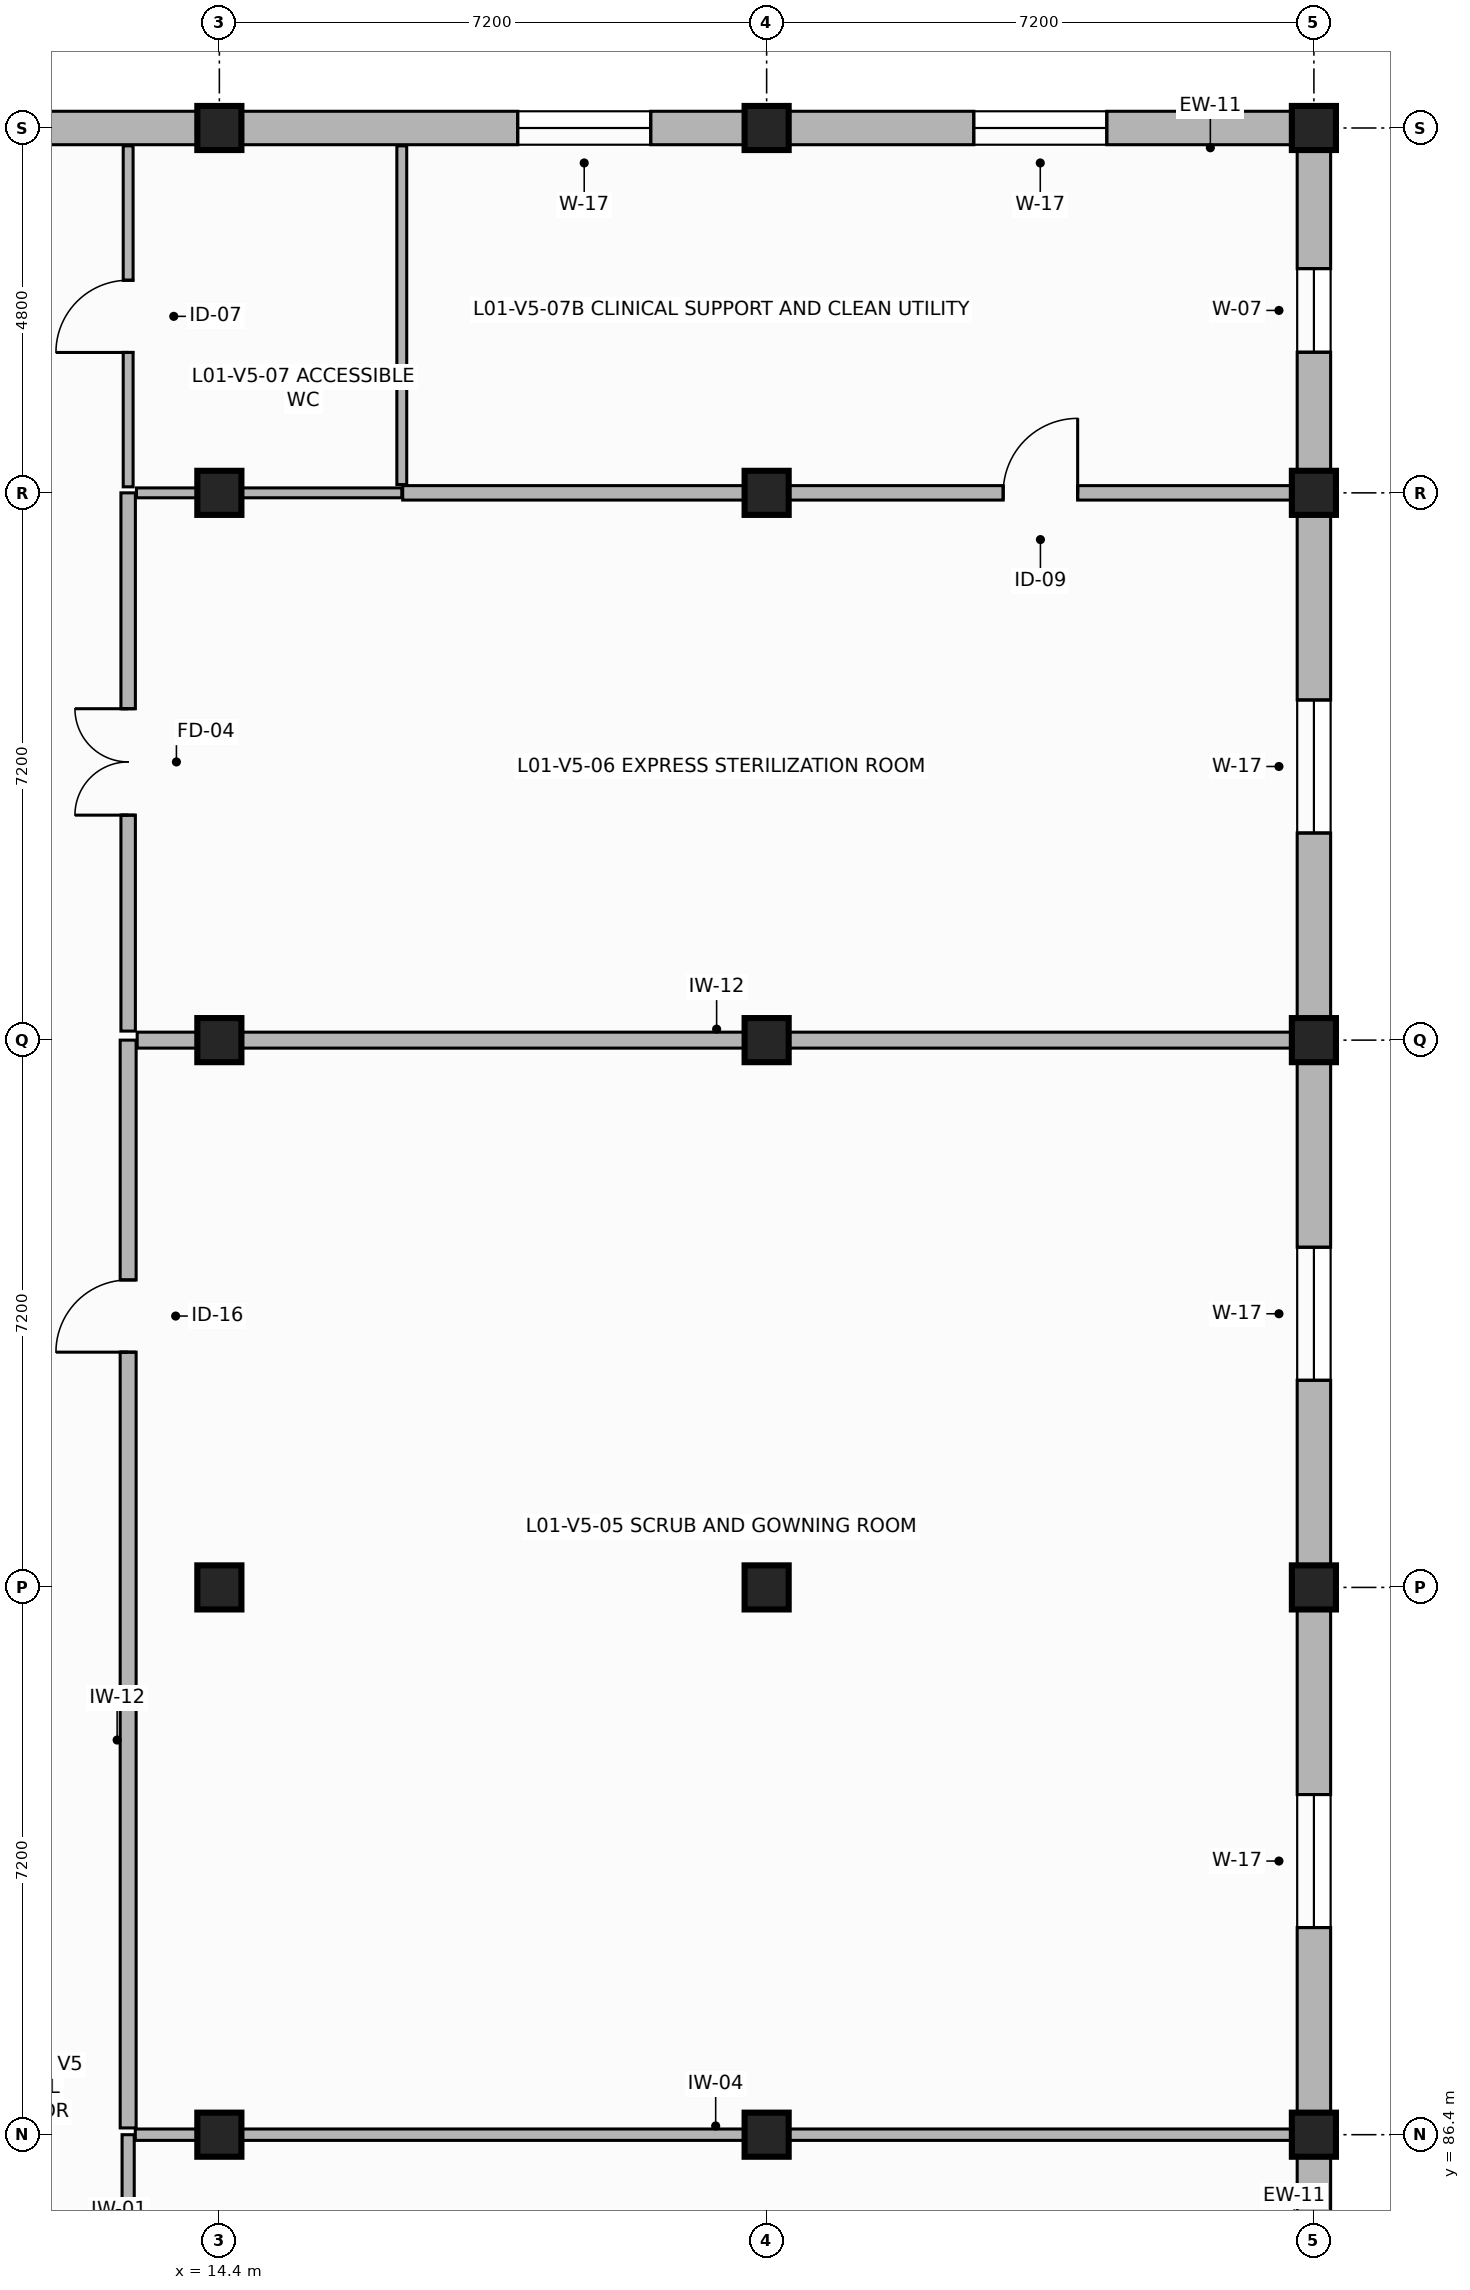
"""IFC4 building model, lengths in metres.
Left out: names, types, materials, properties, quantities, classifications, styles, units other than length and angle.
Written with IfcOpenShell. Run it as: python <this file> out.ifc"""

import sys

from ifc_helpers import new_model, si_unit, direction, frame, frame_2d, origin, origin_2d, place, context, subcontext, project, spatial, rectangle, extrude, element, fill, save


model = new_model("IFC4")
c1 = context("Model", 3, precision=1e-05, world=origin(), true_north=direction((0.0, 1.0)))
c2 = subcontext(c1, "Body", "Model", "MODEL_VIEW")
j1 = project(units=[si_unit("LENGTHUNIT", "METRE"), si_unit("PLANEANGLEUNIT", "RADIAN")], contexts=[c1])
p1 = place(None, origin())
s1 = spatial("IfcSite", under=j1, at=p1, CompositionType="ELEMENT")
p2 = place(p1, origin())
s2 = spatial("IfcBuilding", under=s1, at=p2, CompositionType="ELEMENT")
p3 = place(p2, frame((0.0, 0.0, 4.5)))
s3 = spatial("IfcBuildingStorey", under=s2, at=p3, CompositionType="ELEMENT", Elevation=4.5)
for number, where, z_axis, x_axis in (
    (1, (14.4, 86.4, 0.0), (0.0, 0.0, 1.0), (1.0, 0.0, 0.0)),
    (2, (14.4, 93.6, 0.0), (0.0, 0.0, 1.0), (1.0, 0.0, 0.0)),
    (3, (14.4, 100.8, 0.0), (0.0, 0.0, 1.0), (1.0, 0.0, 0.0)),
    (4, (14.4, 108.0, 0.0), (0.0, 0.0, 1.0), (1.0, 0.0, 0.0)),
    (5, (14.4, 112.8, 0.0), (0.0, 0.0, 1.0), (1.0, 0.0, 0.0)),
    (6, (21.6, 86.4, 0.0), (0.0, 0.0, 1.0), (1.0, 0.0, 0.0)),
    (7, (21.6, 93.6, 0.0), (0.0, 0.0, 1.0), (1.0, 0.0, 0.0)),
    (8, (21.6, 100.8, 0.0), (0.0, 0.0, 1.0), (1.0, 0.0, 0.0)),
    (9, (21.6, 108.0, 0.0), (0.0, 0.0, 1.0), (1.0, 0.0, 0.0)),
    (10, (21.6, 112.8, 0.0), (0.0, 0.0, 1.0), (1.0, 0.0, 0.0)),
    (11, (28.8, 86.4, 0.0), (0.0, 0.0, 1.0), (1.0, 0.0, 0.0)),
    (12, (28.8, 93.6, 0.0), (0.0, 0.0, 1.0), (1.0, 0.0, 0.0)),
    (13, (28.8, 100.8, 0.0), (0.0, 0.0, 1.0), (1.0, 0.0, 0.0)),
    (14, (28.8, 108.0, 0.0), (0.0, 0.0, 1.0), (1.0, 0.0, 0.0)),
    (15, (28.8, 112.8, 0.0), (0.0, 0.0, 1.0), (1.0, 0.0, 0.0)),
):
    element("IfcColumn", number, at=place(p3, frame(where, z_axis=z_axis, x_axis=x_axis)), inside=s3, PredefinedType="COLUMN", context=c2, shape_type="SweptSolid", body=[
        extrude(rectangle(XDim=0.58, YDim=0.58, at=origin_2d()), origin(), (0.0, 0.0, 1.0), 3.59),
    ])
p4 = place(p3, frame((28.8, 79.2, 0.0), z_axis=(0.0, 0.0, 1.0), x_axis=(0.0, 1.0, 0.0)))
e16 = element("IfcWall", 16, at=p4, inside=s3, PredefinedType="SOLIDWALL", context=c2, shape_type="SweptSolid", body=[
    extrude(rectangle(XDim=7.2, YDim=0.44, at=frame_2d((3.6, 0.0))), origin(), (0.0, 0.0, 1.0), 2.92),
])
p5 = place(p4, frame((2.725, 0.0, 0.9)))
e17 = element("IfcOpeningElement", 17, at=p5, cuts=e16, PredefinedType="OPENING", context=c2, shape_type="SweptSolid", body=[
    extrude(rectangle(XDim=1.75, YDim=1.8, at=frame_2d((0.875, 0.9))), frame((0.0, 0.23, 0.0), z_axis=(0.0, -1.0, 0.0), x_axis=(1.0, 0.0, 0.0)), (0.0, 0.0, 1.0), 0.46),
])
p6 = place(p3, frame((28.8, 86.4, 0.0), z_axis=(0.0, 0.0, 1.0), x_axis=(0.0, 1.0, 0.0)))
e18 = element("IfcWall", 18, at=p6, inside=s3, PredefinedType="SOLIDWALL", context=c2, shape_type="SweptSolid", body=[
    extrude(rectangle(XDim=7.2, YDim=0.44, at=frame_2d((3.6, 0.0))), origin(), (0.0, 0.0, 1.0), 2.92),
])
p7 = place(p6, frame((2.725, 0.0, 0.9)))
e19 = element("IfcOpeningElement", 19, at=p7, cuts=e18, PredefinedType="OPENING", context=c2, shape_type="SweptSolid", body=[
    extrude(rectangle(XDim=1.75, YDim=1.8, at=frame_2d((0.875, 0.9))), frame((0.0, 0.23, 0.0), z_axis=(0.0, -1.0, 0.0), x_axis=(1.0, 0.0, 0.0)), (0.0, 0.0, 1.0), 0.46),
])
p8 = place(p3, frame((28.8, 93.6, 0.0), z_axis=(0.0, 0.0, 1.0), x_axis=(0.0, 1.0, 0.0)))
e20 = element("IfcWall", 20, at=p8, inside=s3, PredefinedType="SOLIDWALL", context=c2, shape_type="SweptSolid", body=[
    extrude(rectangle(XDim=7.2, YDim=0.44, at=frame_2d((3.6, 0.0))), origin(), (0.0, 0.0, 1.0), 2.92),
])
p9 = place(p8, frame((2.725, 0.0, 0.9)))
e21 = element("IfcOpeningElement", 21, at=p9, cuts=e20, PredefinedType="OPENING", context=c2, shape_type="SweptSolid", body=[
    extrude(rectangle(XDim=1.75, YDim=1.8, at=frame_2d((0.875, 0.9))), frame((0.0, 0.23, 0.0), z_axis=(0.0, -1.0, 0.0), x_axis=(1.0, 0.0, 0.0)), (0.0, 0.0, 1.0), 0.46),
])
p10 = place(p3, frame((28.8, 100.8, 0.0), z_axis=(0.0, 0.0, 1.0), x_axis=(0.0, 1.0, 0.0)))
e22 = element("IfcWall", 22, at=p10, inside=s3, PredefinedType="SOLIDWALL", context=c2, shape_type="SweptSolid", body=[
    extrude(rectangle(XDim=7.2, YDim=0.44, at=frame_2d((3.6, 0.0))), origin(), (0.0, 0.0, 1.0), 2.92),
])
p11 = place(p10, frame((2.725, 0.0, 0.9)))
e23 = element("IfcOpeningElement", 23, at=p11, cuts=e22, PredefinedType="OPENING", context=c2, shape_type="SweptSolid", body=[
    extrude(rectangle(XDim=1.75, YDim=1.8, at=frame_2d((0.875, 0.9))), frame((0.0, 0.23, 0.0), z_axis=(0.0, -1.0, 0.0), x_axis=(1.0, 0.0, 0.0)), (0.0, 0.0, 1.0), 0.46),
])
p12 = place(p3, frame((28.8, 108.0, 0.0), z_axis=(0.0, 0.0, 1.0), x_axis=(0.0, 1.0, 0.0)))
e24 = element("IfcWall", 24, at=p12, inside=s3, PredefinedType="SOLIDWALL", context=c2, shape_type="SweptSolid", body=[
    extrude(rectangle(XDim=4.8, YDim=0.44, at=frame_2d((2.4, 0.0))), origin(), (0.0, 0.0, 1.0), 2.92),
])
p13 = place(p12, frame((1.85, 0.0, 0.85)))
e25 = element("IfcOpeningElement", 25, at=p13, cuts=e24, PredefinedType="OPENING", context=c2, shape_type="SweptSolid", body=[
    extrude(rectangle(XDim=1.1, YDim=1.85, at=frame_2d((0.55, 0.925))), frame((0.0, 0.23, 0.0), z_axis=(0.0, -1.0, 0.0), x_axis=(1.0, 0.0, 0.0)), (0.0, 0.0, 1.0), 0.46),
])
p14 = place(p3, frame((28.8, 112.8, 0.0), z_axis=(0.0, 0.0, 1.0), x_axis=(-1.0, 0.0, 0.0)))
e26 = element("IfcWall", 26, at=p14, inside=s3, PredefinedType="SOLIDWALL", context=c2, shape_type="SweptSolid", body=[
    extrude(rectangle(XDim=7.2, YDim=0.44, at=frame_2d((3.6, 0.0))), origin(), (0.0, 0.0, 1.0), 2.92),
])
p15 = place(p14, frame((2.725, 0.0, 0.9)))
e27 = element("IfcOpeningElement", 27, at=p15, cuts=e26, PredefinedType="OPENING", context=c2, shape_type="SweptSolid", body=[
    extrude(rectangle(XDim=1.75, YDim=1.8, at=frame_2d((0.875, 0.9))), frame((0.0, 0.23, 0.0), z_axis=(0.0, -1.0, 0.0), x_axis=(1.0, 0.0, 0.0)), (0.0, 0.0, 1.0), 0.46),
])
p16 = place(p3, frame((21.6, 112.8, 0.0), z_axis=(0.0, 0.0, 1.0), x_axis=(-1.0, 0.0, 0.0)))
e28 = element("IfcWall", 28, at=p16, inside=s3, PredefinedType="SOLIDWALL", context=c2, shape_type="SweptSolid", body=[
    extrude(rectangle(XDim=7.2, YDim=0.44, at=frame_2d((3.6, 0.0))), origin(), (0.0, 0.0, 1.0), 2.92),
])
p17 = place(p16, frame((1.525, 0.0, 0.9)))
e29 = element("IfcOpeningElement", 29, at=p17, cuts=e28, PredefinedType="OPENING", context=c2, shape_type="SweptSolid", body=[
    extrude(rectangle(XDim=1.75, YDim=1.8, at=frame_2d((0.875, 0.9))), frame((0.0, 0.23, 0.0), z_axis=(0.0, -1.0, 0.0), x_axis=(1.0, 0.0, 0.0)), (0.0, 0.0, 1.0), 0.46),
])
p18 = place(p3, frame((14.4, 112.8, 0.0), z_axis=(0.0, 0.0, 1.0), x_axis=(-1.0, 0.0, 0.0)))
e30 = element("IfcWall", 30, at=p18, inside=s3, PredefinedType="SOLIDWALL", context=c2, shape_type="SweptSolid", body=[
    extrude(rectangle(XDim=7.2, YDim=0.44, at=frame_2d((3.6, 0.0))), origin(), (0.0, 0.0, 1.0), 2.92),
])
p19 = place(p18, frame((4.725, 0.0, 0.9)))
e31 = element("IfcOpeningElement", 31, at=p19, cuts=e30, PredefinedType="OPENING", context=c2, shape_type="SweptSolid", body=[
    extrude(rectangle(XDim=1.75, YDim=1.8, at=frame_2d((0.875, 0.9))), frame((0.0, 0.23, 0.0), z_axis=(0.0, -1.0, 0.0), x_axis=(1.0, 0.0, 0.0)), (0.0, 0.0, 1.0), 0.46),
])
p20 = place(p3, frame((13.2, 79.435, 0.0), z_axis=(0.0, 0.0, 1.0), x_axis=(0.0, 1.0, 0.0)))
e32 = element("IfcWall", 32, at=p20, inside=s3, PredefinedType="PARTITIONING", context=c2, shape_type="SweptSolid", body=[
    extrude(rectangle(XDim=6.965, YDim=0.16, at=frame_2d((3.482, 0.0))), origin(), (0.0, 0.0, 1.0), 2.9),
])
p21 = place(p20, frame((2.84, 0.0, 0.0)))
e33 = element("IfcOpeningElement", 33, at=p21, cuts=e32, PredefinedType="OPENING", context=c2, shape_type="SweptSolid", body=[
    extrude(rectangle(XDim=1.05, YDim=2.15, at=frame_2d((0.525, 1.075))), frame((0.0, 0.09, 0.0), z_axis=(0.0, -1.0, 0.0), x_axis=(1.0, 0.0, 0.0)), (0.0, 0.0, 1.0), 0.18),
])
p22 = place(p3, frame((13.294, 86.4, 0.0), z_axis=(0.0, 0.0, 1.0), x_axis=(1.0, 0.0, 0.0)))
e34 = element("IfcWall", 34, at=p22, inside=s3, PredefinedType="PARTITIONING", context=c2, shape_type="SweptSolid", body=[
    extrude(rectangle(XDim=15.271, YDim=0.15, at=frame_2d((7.635, 0.0))), origin(), (0.0, 0.0, 1.0), 2.9),
])
p23 = place(p3, frame((13.2, 86.489, 0.0), z_axis=(0.0, 0.0, 1.0), x_axis=(0.0, 1.0, 0.0)))
e35 = element("IfcWall", 35, at=p23, inside=s3, PredefinedType="PARTITIONING", context=c2, shape_type="SweptSolid", body=[
    extrude(rectangle(XDim=14.311, YDim=0.21, at=frame_2d((7.156, 0.0))), origin(), (0.0, 0.0, 1.0), 2.9),
])
p24 = place(p23, frame((10.206, 0.0, 0.0)))
e36 = element("IfcOpeningElement", 36, at=p24, cuts=e35, PredefinedType="OPENING", context=c2, shape_type="SweptSolid", body=[
    extrude(rectangle(XDim=0.95, YDim=2.15, at=frame_2d((0.475, 1.075))), frame((0.0, 0.115, 0.0), z_axis=(0.0, -1.0, 0.0), x_axis=(1.0, 0.0, 0.0)), (0.0, 0.0, 1.0), 0.23),
])
p25 = place(p3, frame((13.319, 100.8, 0.0), z_axis=(0.0, 0.0, 1.0), x_axis=(1.0, 0.0, 0.0)))
e37 = element("IfcWall", 37, at=p25, inside=s3, PredefinedType="PARTITIONING", context=c2, shape_type="SweptSolid", body=[
    extrude(rectangle(XDim=15.246, YDim=0.21, at=frame_2d((7.623, 0.0))), origin(), (0.0, 0.0, 1.0), 2.9),
])
p26 = place(p3, frame((13.2, 100.919, 0.0), z_axis=(0.0, 0.0, 1.0), x_axis=(0.0, 1.0, 0.0)))
e38 = element("IfcWall", 38, at=p26, inside=s3, PredefinedType="PARTITIONING", context=c2, shape_type="SweptSolid", body=[
    extrude(rectangle(XDim=7.081, YDim=0.19, at=frame_2d((3.541, 0.0))), origin(), (0.0, 0.0, 1.0), 2.9),
])
p27 = place(p26, frame((2.841, 0.0, 0.0)))
e39 = element("IfcOpeningElement", 39, at=p27, cuts=e38, PredefinedType="OPENING", context=c2, shape_type="SweptSolid", body=[
    extrude(rectangle(XDim=1.4, YDim=2.25, at=frame_2d((0.7, 1.125))), frame((0.0, 0.105, 0.0), z_axis=(0.0, -1.0, 0.0), x_axis=(1.0, 0.0, 0.0)), (0.0, 0.0, 1.0), 0.21),
])
p28 = place(p3, frame((13.309, 108.0, 0.0), z_axis=(0.0, 0.0, 1.0), x_axis=(1.0, 0.0, 0.0)))
e40 = element("IfcWall", 40, at=p28, inside=s3, PredefinedType="PARTITIONING", context=c2, shape_type="SweptSolid", body=[
    extrude(rectangle(XDim=3.491, YDim=0.13, at=frame_2d((1.746, 0.0))), origin(), (0.0, 0.0, 1.0), 2.9),
])
p29 = place(p3, frame((16.812, 108.0, 0.0), z_axis=(0.0, 0.0, 1.0), x_axis=(1.0, 0.0, 0.0)))
e41 = element("IfcWall", 41, at=p29, inside=s3, PredefinedType="PARTITIONING", context=c2, shape_type="SweptSolid", body=[
    extrude(rectangle(XDim=11.753, YDim=0.19, at=frame_2d((5.876, 0.0))), origin(), (0.0, 0.0, 1.0), 2.9),
])
p30 = place(p29, frame((7.9, 0.0, 0.0)))
e42 = element("IfcOpeningElement", 42, at=p30, cuts=e41, PredefinedType="OPENING", context=c2, shape_type="SweptSolid", body=[
    extrude(rectangle(XDim=0.98, YDim=2.15, at=frame_2d((0.49, 1.075))), frame((0.0, 0.105, 0.0), z_axis=(0.0, -1.0, 0.0), x_axis=(1.0, 0.0, 0.0)), (0.0, 0.0, 1.0), 0.21),
])
p31 = place(p3, frame((16.8, 112.565, 0.0), z_axis=(0.0, 0.0, 1.0), x_axis=(0.0, -1.0, 0.0)))
e43 = element("IfcWall", 43, at=p31, inside=s3, PredefinedType="PARTITIONING", context=c2, shape_type="SweptSolid", body=[
    extrude(rectangle(XDim=4.456, YDim=0.13, at=frame_2d((2.228, 0.0))), origin(), (0.0, 0.0, 1.0), 2.9),
])
p32 = place(p3, frame((13.2, 108.079, 0.0), z_axis=(0.0, 0.0, 1.0), x_axis=(0.0, 1.0, 0.0)))
e44 = element("IfcWall", 44, at=p32, inside=s3, PredefinedType="PARTITIONING", context=c2, shape_type="SweptSolid", body=[
    extrude(rectangle(XDim=4.486, YDim=0.13, at=frame_2d((2.243, 0.0))), origin(), (0.0, 0.0, 1.0), 2.9),
])
p33 = place(p32, frame((1.768, 0.0, 0.0)))
e45 = element("IfcOpeningElement", 45, at=p33, cuts=e44, PredefinedType="OPENING", context=c2, shape_type="SweptSolid", body=[
    extrude(rectangle(XDim=0.95, YDim=2.1, at=frame_2d((0.475, 1.05))), frame((0.0, 0.075, 0.0), z_axis=(0.0, -1.0, 0.0), x_axis=(1.0, 0.0, 0.0)), (0.0, 0.0, 1.0), 0.15),
])
p34 = place(p7, origin())
e46 = element("IfcWindow", 46, at=p34, inside=s3, PartitioningType="SINGLE_PANEL", PredefinedType="WINDOW", context=c2, shape_type="SweptSolid", body=[
    extrude(rectangle(XDim=1.75, YDim=1.8, at=frame_2d((0.875, 0.9))), frame((0.0, 0.03, 0.0), z_axis=(0.0, -1.0, 0.0), x_axis=(1.0, 0.0, 0.0)), (0.0, 0.0, 1.0), 0.06),
])
fill(e19, e46)
p35 = place(p9, origin())
e47 = element("IfcWindow", 47, at=p35, inside=s3, PartitioningType="SINGLE_PANEL", PredefinedType="WINDOW", context=c2, shape_type="SweptSolid", body=[
    extrude(rectangle(XDim=1.75, YDim=1.8, at=frame_2d((0.875, 0.9))), frame((0.0, 0.03, 0.0), z_axis=(0.0, -1.0, 0.0), x_axis=(1.0, 0.0, 0.0)), (0.0, 0.0, 1.0), 0.06),
])
fill(e21, e47)
p36 = place(p11, origin())
e48 = element("IfcWindow", 48, at=p36, inside=s3, PartitioningType="SINGLE_PANEL", PredefinedType="WINDOW", context=c2, shape_type="SweptSolid", body=[
    extrude(rectangle(XDim=1.75, YDim=1.8, at=frame_2d((0.875, 0.9))), frame((0.0, 0.03, 0.0), z_axis=(0.0, -1.0, 0.0), x_axis=(1.0, 0.0, 0.0)), (0.0, 0.0, 1.0), 0.06),
])
fill(e23, e48)
p37 = place(p13, origin())
e49 = element("IfcWindow", 49, at=p37, inside=s3, PartitioningType="SINGLE_PANEL", PredefinedType="WINDOW", context=c2, shape_type="SweptSolid", body=[
    extrude(rectangle(XDim=1.1, YDim=1.85, at=frame_2d((0.55, 0.925))), frame((0.0, 0.03, 0.0), z_axis=(0.0, -1.0, 0.0), x_axis=(1.0, 0.0, 0.0)), (0.0, 0.0, 1.0), 0.06),
])
fill(e25, e49)
p38 = place(p15, origin())
e50 = element("IfcWindow", 50, at=p38, inside=s3, PartitioningType="SINGLE_PANEL", PredefinedType="WINDOW", context=c2, shape_type="SweptSolid", body=[
    extrude(rectangle(XDim=1.75, YDim=1.8, at=frame_2d((0.875, 0.9))), frame((0.0, 0.03, 0.0), z_axis=(0.0, -1.0, 0.0), x_axis=(1.0, 0.0, 0.0)), (0.0, 0.0, 1.0), 0.06),
])
fill(e27, e50)
p39 = place(p17, origin())
e51 = element("IfcWindow", 51, at=p39, inside=s3, PartitioningType="SINGLE_PANEL", PredefinedType="WINDOW", context=c2, shape_type="SweptSolid", body=[
    extrude(rectangle(XDim=1.75, YDim=1.8, at=frame_2d((0.875, 0.9))), frame((0.0, 0.03, 0.0), z_axis=(0.0, -1.0, 0.0), x_axis=(1.0, 0.0, 0.0)), (0.0, 0.0, 1.0), 0.06),
])
fill(e29, e51)
p40 = place(p24, origin())
e52 = element("IfcDoor", 52, at=p40, inside=s3, OperationType="SINGLE_SWING_LEFT", PredefinedType="DOOR", context=c2, shape_type="SweptSolid", body=[
    extrude(rectangle(XDim=0.95, YDim=2.15, at=frame_2d((0.475, 1.075))), frame((0.0, 0.025, 0.0), z_axis=(0.0, -1.0, 0.0), x_axis=(1.0, 0.0, 0.0)), (0.0, 0.0, 1.0), 0.05),
])
fill(e36, e52)
p41 = place(p27, origin())
e53 = element("IfcDoor", 53, at=p41, inside=s3, OperationType="DOUBLE_DOOR_SINGLE_SWING", PredefinedType="DOOR", context=c2, shape_type="SweptSolid", body=[
    extrude(rectangle(XDim=1.4, YDim=2.25, at=frame_2d((0.7, 1.125))), frame((0.0, 0.025, 0.0), z_axis=(0.0, -1.0, 0.0), x_axis=(1.0, 0.0, 0.0)), (0.0, 0.0, 1.0), 0.05),
])
fill(e39, e53)
p42 = place(p33, origin())
e54 = element("IfcDoor", 54, at=p42, inside=s3, OperationType="SINGLE_SWING_LEFT", PredefinedType="DOOR", context=c2, shape_type="SweptSolid", body=[
    extrude(rectangle(XDim=0.95, YDim=2.1, at=frame_2d((0.475, 1.05))), frame((0.0, 0.025, 0.0), z_axis=(0.0, -1.0, 0.0), x_axis=(1.0, 0.0, 0.0)), (0.0, 0.0, 1.0), 0.05),
])
fill(e45, e54)
p43 = place(p30, origin())
e55 = element("IfcDoor", 55, at=p43, inside=s3, OperationType="SINGLE_SWING_RIGHT", PredefinedType="DOOR", context=c2, shape_type="SweptSolid", body=[
    extrude(rectangle(XDim=0.98, YDim=2.15, at=frame_2d((0.49, 1.075))), frame((0.0, 0.025, 0.0), z_axis=(0.0, -1.0, 0.0), x_axis=(1.0, 0.0, 0.0)), (0.0, 0.0, 1.0), 0.05),
])
fill(e42, e55)
save(model, sys.argv[1])
